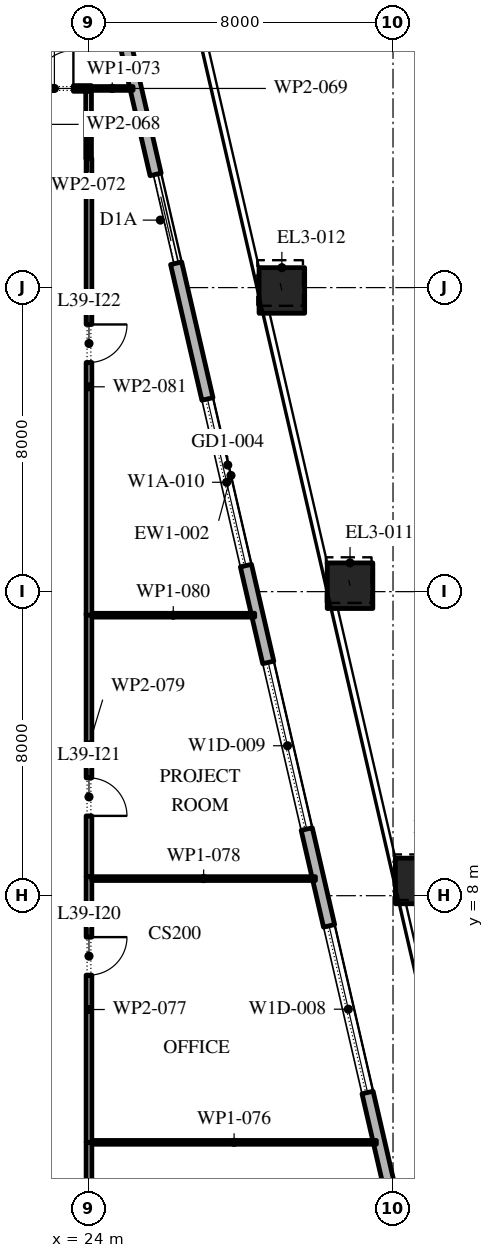
"""IFC4 building model, lengths in metres.
Left out: names, types, materials, properties, quantities, classifications, styles, units other than length and angle.
Written with IfcOpenShell. Run it as: python <this file> out.ifc"""

import sys

from ifc_helpers import new_model, si_unit, direction, frame, frame_2d, origin, origin_2d, place, context, subcontext, project, spatial, rectangle, extrude, element, fill, save


model = new_model("IFC4")
c1 = context("Model", 3, precision=1e-05, world=origin(), true_north=direction((0.0, 1.0)))
c2 = subcontext(c1, "Body", "Model", "MODEL_VIEW")
j1 = project(units=[si_unit("LENGTHUNIT", "METRE"), si_unit("PLANEANGLEUNIT", "RADIAN")], contexts=[c1])
p1 = place(None, origin())
s1 = spatial("IfcSite", under=j1, at=p1, CompositionType="ELEMENT")
p2 = place(p1, origin())
s2 = spatial("IfcBuilding", under=s1, at=p2, CompositionType="ELEMENT")
p3 = place(p2, frame((0.0, 0.0, 180.0)))
s3 = spatial("IfcBuildingStorey", under=s2, at=p3, CompositionType="ELEMENT", Elevation=180.0)
p4 = place(p3, frame((32.662, 8.388, 0.0), z_axis=(-0.005404472139, 0.023419379268, 0.999711120452), x_axis=(-0.974391195695, -0.224859506699, 0.0)))
e1 = element("IfcColumn", 1, at=p4, inside=s3, PredefinedType="COLUMN", context=c2, shape_type="SweptSolid", body=[
    extrude(rectangle(XDim=1.2, YDim=1.2, at=origin_2d()), origin(), (0.0, 0.0, 1.0), 4.201),
])
p5 = place(p3, frame((30.869, 16.156, 0.0), z_axis=(-0.0080747472, 0.035087390713, 0.999351626541), x_axis=(-0.974526982896, -0.224270282488, 0.0)))
e2 = element("IfcColumn", 2, at=p5, inside=s3, PredefinedType="COLUMN", context=c2, shape_type="SweptSolid", body=[
    extrude(rectangle(XDim=1.2, YDim=1.2, at=origin_2d()), origin(), (0.0, 0.0, 1.0), 4.203),
])
p6 = place(p3, frame((29.075, 23.925, 0.0), z_axis=(-0.010799619665, 0.046740289408, 0.998848694028), x_axis=(-0.974329962248, -0.225124686929, 0.0)))
e3 = element("IfcColumn", 3, at=p6, inside=s3, PredefinedType="COLUMN", context=c2, shape_type="SweptSolid", body=[
    extrude(rectangle(XDim=1.2, YDim=1.2, at=origin_2d()), origin(), (0.0, 0.0, 1.0), 4.205),
])
p7 = place(p3, frame((33.157, -5.092, 0.0), z_axis=(0.0, 0.0, 1.0), x_axis=(-0.224950279389, 0.974370243697, 0.0)))
e4 = element("IfcWall", 4, at=p7, inside=s3, PredefinedType="STANDARD", context=c2, shape_type="SweptSolid", body=[
    extrude(rectangle(XDim=49.5, YDim=0.3, at=frame_2d((24.75, 0.0))), origin(), (0.0, 0.0, 1.0), 4.0),
])
p8 = place(p7, frame((2.207, 0.0, 0.0)))
e5 = element("IfcOpeningElement", 5, at=p8, cuts=e4, PredefinedType="OPENING", context=c2, shape_type="SweptSolid", body=[
    extrude(rectangle(XDim=2.4, YDim=3.125, at=frame_2d((1.2, 1.562))), frame((0.0, 0.16, 0.0), z_axis=(0.0, -1.0, 0.0), x_axis=(1.0, 0.0, 0.0)), (0.0, 0.0, 1.0), 0.32),
])
p9 = place(p7, frame((8.121, 0.0, 0.45)))
e6 = element("IfcOpeningElement", 6, at=p9, cuts=e4, PredefinedType="OPENING", context=c2, shape_type="SweptSolid", body=[
    extrude(rectangle(XDim=4.5, YDim=2.875, at=frame_2d((2.25, 1.438))), frame((0.0, 0.16, 0.0), z_axis=(0.0, -1.0, 0.0), x_axis=(1.0, 0.0, 0.0)), (0.0, 0.0, 1.0), 0.32),
])
p10 = place(p7, frame((15.236, 0.0, 0.45)))
e7 = element("IfcOpeningElement", 7, at=p10, cuts=e4, PredefinedType="OPENING", context=c2, shape_type="SweptSolid", body=[
    extrude(rectangle(XDim=4.5, YDim=2.875, at=frame_2d((2.25, 1.438))), frame((0.0, 0.16, 0.0), z_axis=(0.0, -1.0, 0.0), x_axis=(1.0, 0.0, 0.0)), (0.0, 0.0, 1.0), 0.32),
])
p11 = place(p7, frame((22.35, 0.0, 0.45)))
e8 = element("IfcOpeningElement", 8, at=p11, cuts=e4, PredefinedType="OPENING", context=c2, shape_type="SweptSolid", body=[
    extrude(rectangle(XDim=4.5, YDim=3.0, at=frame_2d((2.25, 1.5))), frame((0.0, 0.16, 0.0), z_axis=(0.0, -1.0, 0.0), x_axis=(1.0, 0.0, 0.0)), (0.0, 0.0, 1.0), 0.32),
])
p12 = place(p7, frame((30.514, 0.0, 0.0)))
e9 = element("IfcOpeningElement", 9, at=p12, cuts=e4, PredefinedType="OPENING", context=c2, shape_type="SweptSolid", body=[
    extrude(rectangle(XDim=2.4, YDim=3.45, at=frame_2d((1.2, 1.725))), frame((0.0, 0.16, 0.0), z_axis=(0.0, -1.0, 0.0), x_axis=(1.0, 0.0, 0.0)), (0.0, 0.0, 1.0), 0.32),
])
p13 = place(p7, frame((36.579, 0.0, 0.45)))
e10 = element("IfcOpeningElement", 10, at=p13, cuts=e4, PredefinedType="OPENING", context=c2, shape_type="SweptSolid", body=[
    extrude(rectangle(XDim=4.5, YDim=3.05, at=frame_2d((2.25, 1.525))), frame((0.0, 0.16, 0.0), z_axis=(0.0, -1.0, 0.0), x_axis=(1.0, 0.0, 0.0)), (0.0, 0.0, 1.0), 0.32),
])
p14 = place(p7, frame((43.693, 0.0, 0.45)))
e11 = element("IfcOpeningElement", 11, at=p14, cuts=e4, PredefinedType="OPENING", context=c2, shape_type="SweptSolid", body=[
    extrude(rectangle(XDim=4.5, YDim=3.05, at=frame_2d((2.25, 1.525))), frame((0.0, 0.16, 0.0), z_axis=(0.0, -1.0, 0.0), x_axis=(1.0, 0.0, 0.0)), (0.0, 0.0, 1.0), 0.32),
])
p15 = place(p3, frame((22.01, 29.24, 0.0), z_axis=(0.0, 0.0, 1.0), x_axis=(1.0, 0.0, 0.0)))
e12 = element("IfcWall", 12, at=p15, inside=s3, PredefinedType="PARTITIONING", context=c2, shape_type="SweptSolid", body=[
    extrude(rectangle(XDim=2.055, YDim=0.15, at=frame_2d((1.027, 0.0))), origin(), (0.0, 0.0, 1.0), 4.0),
])
p16 = place(p15, frame((0.58, 0.0, 0.0)))
e13 = element("IfcOpeningElement", 13, at=p16, cuts=e12, PredefinedType="OPENING", context=c2, shape_type="SweptSolid", body=[
    extrude(rectangle(XDim=1.0, YDim=2.1, at=frame_2d((0.5, 1.05))), frame((0.0, 0.085, 0.0), z_axis=(0.0, -1.0, 0.0), x_axis=(1.0, 0.0, 0.0)), (0.0, 0.0, 1.0), 0.17),
])
p17 = place(p3, frame((23.99, 29.165, 0.0), z_axis=(0.0, 0.0, 1.0), x_axis=(0.0, -1.0, 0.0)))
e14 = element("IfcWall", 14, at=p17, inside=s3, PredefinedType="PARTITIONING", context=c2, shape_type="SweptSolid", body=[
    extrude(rectangle(XDim=1.765, YDim=0.15, at=frame_2d((0.883, 0.0))), origin(), (0.0, 0.0, 1.0), 4.0),
])
p18 = place(p3, frame((24.065, 29.24, 0.0), z_axis=(0.0, 0.0, 1.0), x_axis=(1.0, 0.0, 0.0)))
e15 = element("IfcWall", 15, at=p18, inside=s3, PredefinedType="PARTITIONING", context=c2, shape_type="SweptSolid", body=[
    extrude(rectangle(XDim=1.095, YDim=0.1, at=frame_2d((0.547, 0.0))), origin(), (0.0, 0.0, 1.0), 4.0),
])
p19 = place(p3, frame((24.0, 1.51, 0.0), z_axis=(0.0, 0.0, 1.0), x_axis=(0.0, -1.0, 0.0)))
e16 = element("IfcWall", 16, at=p19, inside=s3, PredefinedType="PARTITIONING", context=c2, shape_type="SweptSolid", body=[
    extrude(rectangle(XDim=6.435, YDim=0.15, at=frame_2d((3.218, 0.0))), origin(), (0.0, 0.0, 1.0), 4.0),
])
p20 = place(p19, frame((3.36, 0.0, 0.0)))
e17 = element("IfcOpeningElement", 17, at=p20, cuts=e16, PredefinedType="OPENING", context=c2, shape_type="SweptSolid", body=[
    extrude(rectangle(XDim=1.0, YDim=2.1, at=frame_2d((0.5, 1.05))), frame((0.0, 0.085, 0.0), z_axis=(0.0, -1.0, 0.0), x_axis=(1.0, 0.0, 0.0)), (0.0, 0.0, 1.0), 0.17),
])
p21 = place(p3, frame((24.075, 1.51, 0.0), z_axis=(0.0, 0.0, 1.0), x_axis=(1.0, 0.0, 0.0)))
e18 = element("IfcWall", 18, at=p21, inside=s3, PredefinedType="PARTITIONING", context=c2, shape_type="SweptSolid", body=[
    extrude(rectangle(XDim=7.487, YDim=0.1, at=frame_2d((3.744, 0.0))), origin(), (0.0, 0.0, 1.0), 4.0),
])
p22 = place(p3, frame((24.0, 8.5, 0.0), z_axis=(0.0, 0.0, 1.0), x_axis=(0.0, -1.0, 0.0)))
e19 = element("IfcWall", 19, at=p22, inside=s3, PredefinedType="PARTITIONING", context=c2, shape_type="SweptSolid", body=[
    extrude(rectangle(XDim=6.99, YDim=0.15, at=frame_2d((3.495, 0.0))), origin(), (0.0, 0.0, 1.0), 4.0),
])
p23 = place(p22, frame((1.59, 0.0, 0.0)))
e20 = element("IfcOpeningElement", 20, at=p23, cuts=e19, PredefinedType="OPENING", context=c2, shape_type="SweptSolid", body=[
    extrude(rectangle(XDim=1.0, YDim=2.1, at=frame_2d((0.5, 1.05))), frame((0.0, 0.085, 0.0), z_axis=(0.0, -1.0, 0.0), x_axis=(1.0, 0.0, 0.0)), (0.0, 0.0, 1.0), 0.17),
])
p24 = place(p3, frame((24.075, 8.45, 0.0), z_axis=(0.0, 0.0, 1.0), x_axis=(1.0, 0.0, 0.0)))
e21 = element("IfcWall", 21, at=p24, inside=s3, PredefinedType="PARTITIONING", context=c2, shape_type="SweptSolid", body=[
    extrude(rectangle(XDim=5.884, YDim=0.1, at=frame_2d((2.942, 0.0))), origin(), (0.0, 0.0, 1.0), 4.0),
])
p25 = place(p3, frame((24.0, 15.43, 0.0), z_axis=(0.0, 0.0, 1.0), x_axis=(0.0, -1.0, 0.0)))
e22 = element("IfcWall", 22, at=p25, inside=s3, PredefinedType="PARTITIONING", context=c2, shape_type="SweptSolid", body=[
    extrude(rectangle(XDim=6.93, YDim=0.15, at=frame_2d((3.465, 0.0))), origin(), (0.0, 0.0, 1.0), 4.0),
])
p26 = place(p25, frame((4.33, 0.0, 0.0)))
e23 = element("IfcOpeningElement", 23, at=p26, cuts=e22, PredefinedType="OPENING", context=c2, shape_type="SweptSolid", body=[
    extrude(rectangle(XDim=1.0, YDim=2.1, at=frame_2d((0.5, 1.05))), frame((0.0, 0.085, 0.0), z_axis=(0.0, -1.0, 0.0), x_axis=(1.0, 0.0, 0.0)), (0.0, 0.0, 1.0), 0.17),
])
p27 = place(p3, frame((24.075, 15.38, 0.0), z_axis=(0.0, 0.0, 1.0), x_axis=(1.0, 0.0, 0.0)))
e24 = element("IfcWall", 24, at=p27, inside=s3, PredefinedType="PARTITIONING", context=c2, shape_type="SweptSolid", body=[
    extrude(rectangle(XDim=4.285, YDim=0.1, at=frame_2d((2.143, 0.0))), origin(), (0.0, 0.0, 1.0), 4.0),
])
p28 = place(p3, frame((24.0, 27.4, 0.0), z_axis=(0.0, 0.0, 1.0), x_axis=(0.0, -1.0, 0.0)))
e25 = element("IfcWall", 25, at=p28, inside=s3, PredefinedType="PARTITIONING", context=c2, shape_type="SweptSolid", body=[
    extrude(rectangle(XDim=12.02, YDim=0.15, at=frame_2d((6.01, 0.0))), origin(), (0.0, 0.0, 1.0), 4.0),
])
p29 = place(p28, frame((4.37, 0.0, 0.0)))
e26 = element("IfcOpeningElement", 26, at=p29, cuts=e25, PredefinedType="OPENING", context=c2, shape_type="SweptSolid", body=[
    extrude(rectangle(XDim=1.0, YDim=2.1, at=frame_2d((0.5, 1.05))), frame((0.0, 0.085, 0.0), z_axis=(0.0, -1.0, 0.0), x_axis=(1.0, 0.0, 0.0)), (0.0, 0.0, 1.0), 0.17),
])
p30 = place(p9, origin())
e27 = element("IfcWindow", 27, at=p30, inside=s3, PartitioningType="DOUBLE_PANEL_VERTICAL", PredefinedType="WINDOW", context=c2, shape_type="SweptSolid", body=[
    extrude(rectangle(XDim=4.5, YDim=2.875, at=frame_2d((2.25, 1.438))), frame((0.0, 0.03, 0.0), z_axis=(0.0, -1.0, 0.0), x_axis=(1.0, 0.0, 0.0)), (0.0, 0.0, 1.0), 0.06),
])
fill(e6, e27)
p31 = place(p10, origin())
e28 = element("IfcWindow", 28, at=p31, inside=s3, PartitioningType="DOUBLE_PANEL_VERTICAL", PredefinedType="WINDOW", context=c2, shape_type="SweptSolid", body=[
    extrude(rectangle(XDim=4.5, YDim=2.875, at=frame_2d((2.25, 1.438))), frame((0.0, 0.03, 0.0), z_axis=(0.0, -1.0, 0.0), x_axis=(1.0, 0.0, 0.0)), (0.0, 0.0, 1.0), 0.06),
])
fill(e7, e28)
p32 = place(p11, origin())
e29 = element("IfcWindow", 29, at=p32, inside=s3, PartitioningType="DOUBLE_PANEL_VERTICAL", PredefinedType="WINDOW", context=c2, shape_type="SweptSolid", body=[
    extrude(rectangle(XDim=4.5, YDim=3.0, at=frame_2d((2.25, 1.5))), frame((0.0, 0.03, 0.0), z_axis=(0.0, -1.0, 0.0), x_axis=(1.0, 0.0, 0.0)), (0.0, 0.0, 1.0), 0.06),
])
fill(e8, e29)
p33 = place(p12, origin())
e30 = element("IfcDoor", 30, at=p33, inside=s3, OperationType="DOUBLE_DOOR_SLIDING", PredefinedType="DOOR", context=c2, shape_type="SweptSolid", body=[
    extrude(rectangle(XDim=2.4, YDim=3.45, at=frame_2d((1.2, 1.725))), frame((0.0, 0.025, 0.0), z_axis=(0.0, -1.0, 0.0), x_axis=(1.0, 0.0, 0.0)), (0.0, 0.0, 1.0), 0.05),
])
fill(e9, e30)
p34 = place(p23, origin())
e31 = element("IfcDoor", 31, at=p34, inside=s3, OperationType="SINGLE_SWING_RIGHT", PredefinedType="DOOR", context=c2, shape_type="SweptSolid", body=[
    extrude(rectangle(XDim=1.0, YDim=2.1, at=frame_2d((0.5, 1.05))), frame((0.0, 0.025, 0.0), z_axis=(0.0, -1.0, 0.0), x_axis=(1.0, 0.0, 0.0)), (0.0, 0.0, 1.0), 0.05),
])
fill(e20, e31)
p35 = place(p26, origin())
e32 = element("IfcDoor", 32, at=p35, inside=s3, OperationType="SINGLE_SWING_LEFT", PredefinedType="DOOR", context=c2, shape_type="SweptSolid", body=[
    extrude(rectangle(XDim=1.0, YDim=2.1, at=frame_2d((0.5, 1.05))), frame((0.0, 0.025, 0.0), z_axis=(0.0, -1.0, 0.0), x_axis=(1.0, 0.0, 0.0)), (0.0, 0.0, 1.0), 0.05),
])
fill(e23, e32)
p36 = place(p29, origin())
e33 = element("IfcDoor", 33, at=p36, inside=s3, OperationType="SINGLE_SWING_RIGHT", PredefinedType="DOOR", context=c2, shape_type="SweptSolid", body=[
    extrude(rectangle(XDim=1.0, YDim=2.1, at=frame_2d((0.5, 1.05))), frame((0.0, 0.025, 0.0), z_axis=(0.0, -1.0, 0.0), x_axis=(1.0, 0.0, 0.0)), (0.0, 0.0, 1.0), 0.05),
])
fill(e26, e33)
p37 = place(p16, origin())
e34 = element("IfcDoor", 34, at=p37, inside=s3, OperationType="SINGLE_SWING_LEFT", PredefinedType="DOOR", context=c2, shape_type="SweptSolid", body=[
    extrude(rectangle(XDim=1.0, YDim=2.1, at=frame_2d((0.5, 1.05))), frame((0.0, 0.025, 0.0), z_axis=(0.0, -1.0, 0.0), x_axis=(1.0, 0.0, 0.0)), (0.0, 0.0, 1.0), 0.05),
])
fill(e13, e34)
save(model, sys.argv[1])
